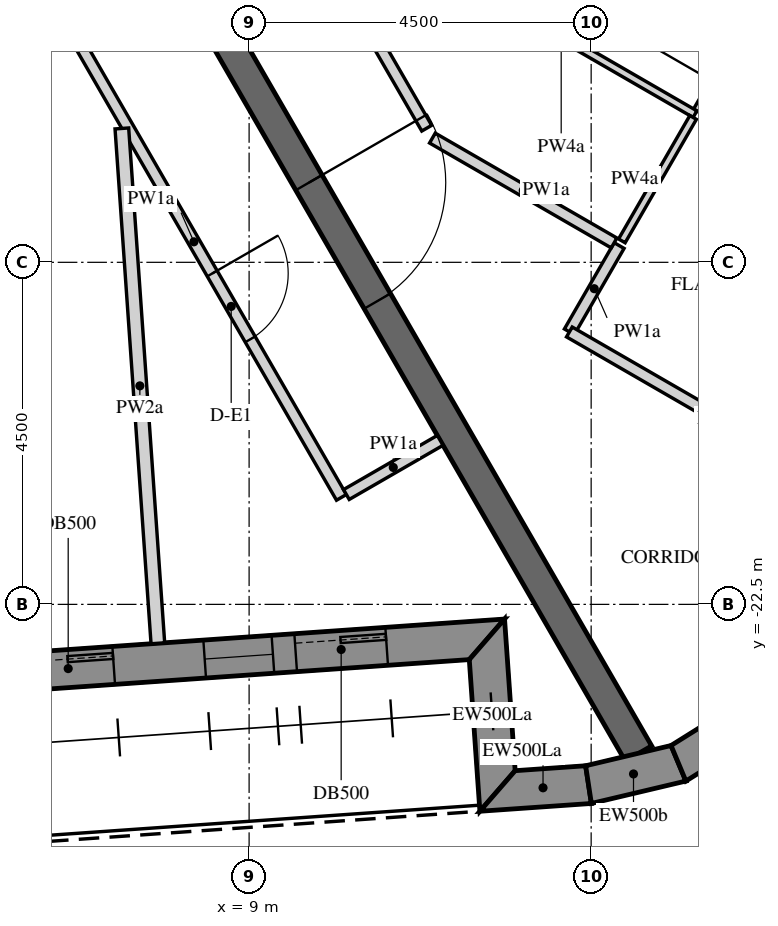
"""IFC4 building model, lengths in metres.
Left out: names, types, materials, properties, quantities, classifications, styles, units other than length and angle.
Written with IfcOpenShell. Run it as: python <this file> out.ifc"""

import sys

from ifc_helpers import new_model, si_unit, direction, frame, frame_2d, origin, place, context, subcontext, project, spatial, polyline, rectangle, outline, extrude, element, fill, save


model = new_model("IFC4")
c1 = context("Model", 3, precision=1e-05, world=origin(), true_north=direction((0.0, 1.0)))
c2 = subcontext(c1, "Body", "Model", "MODEL_VIEW")
j1 = project(units=[si_unit("LENGTHUNIT", "METRE"), si_unit("PLANEANGLEUNIT", "RADIAN")], contexts=[c1])
p1 = place(None, origin())
s1 = spatial("IfcSite", under=j1, at=p1, CompositionType="ELEMENT")
p2 = place(p1, origin())
s2 = spatial("IfcBuilding", under=s1, at=p2, CompositionType="ELEMENT")
p3 = place(p2, frame((0.0, 0.0, 334.2)))
s3 = spatial("IfcBuildingStorey", under=s2, at=p3, CompositionType="ELEMENT", Elevation=334.2)
p4 = place(p3, frame((-10.86, -24.567, -0.15), z_axis=(0.0, 0.0, 1.0), x_axis=(0.997564329317, 0.06975248292, 0.0)))
e1 = element("IfcWall", 1, at=p4, inside=s3, PredefinedType="SOLIDWALL", context=c2, shape_type="SweptSolid", body=[
    extrude(outline(polyline([(0.25, -0.25), (22.795, -0.25), (23.295, 0.25), (-0.25, 0.25), (0.25, -0.25)])), origin(), (0.0, 0.0, 1.0), 3.75),
])
p5 = place(p4, frame((1.323, 0.0, 1.05)))
e2 = element("IfcOpeningElement", 2, at=p5, cuts=e1, PredefinedType="OPENING", context=c2, shape_type="SweptSolid", body=[
    extrude(rectangle(XDim=0.9, YDim=1.5, at=frame_2d((0.45, 0.75))), frame((0.0, 0.26, 0.0), z_axis=(0.0, -1.0, 0.0), x_axis=(1.0, 0.0, 0.0)), (0.0, 0.0, 1.0), 0.52),
])
p6 = place(p4, frame((2.522, 0.0, 0.15)))
e3 = element("IfcOpeningElement", 3, at=p6, cuts=e1, PredefinedType="OPENING", context=c2, shape_type="SweptSolid", body=[
    extrude(rectangle(XDim=1.2, YDim=2.4, at=frame_2d((0.6, 1.2))), frame((0.0, 0.26, 0.0), z_axis=(0.0, -1.0, 0.0), x_axis=(1.0, 0.0, 0.0)), (0.0, 0.0, 1.0), 0.52),
])
p7 = place(p4, frame((4.922, 0.0, 1.05)))
e4 = element("IfcOpeningElement", 4, at=p7, cuts=e1, PredefinedType="OPENING", context=c2, shape_type="SweptSolid", body=[
    extrude(rectangle(XDim=0.9, YDim=1.5, at=frame_2d((0.45, 0.75))), frame((0.0, 0.26, 0.0), z_axis=(0.0, -1.0, 0.0), x_axis=(1.0, 0.0, 0.0)), (0.0, 0.0, 1.0), 0.52),
])
p8 = place(p4, frame((6.122, 0.0, 0.15)))
e5 = element("IfcOpeningElement", 5, at=p8, cuts=e1, PredefinedType="OPENING", context=c2, shape_type="SweptSolid", body=[
    extrude(rectangle(XDim=1.2, YDim=2.4, at=frame_2d((0.6, 1.2))), frame((0.0, 0.26, 0.0), z_axis=(0.0, -1.0, 0.0), x_axis=(1.0, 0.0, 0.0)), (0.0, 0.0, 1.0), 0.52),
])
p9 = place(p4, frame((8.522, 0.0, 1.05)))
e6 = element("IfcOpeningElement", 6, at=p9, cuts=e1, PredefinedType="OPENING", context=c2, shape_type="SweptSolid", body=[
    extrude(rectangle(XDim=0.9, YDim=1.5, at=frame_2d((0.45, 0.75))), frame((0.0, 0.26, 0.0), z_axis=(0.0, -1.0, 0.0), x_axis=(1.0, 0.0, 0.0)), (0.0, 0.0, 1.0), 0.52),
])
p10 = place(p4, frame((9.722, 0.0, 0.15)))
e7 = element("IfcOpeningElement", 7, at=p10, cuts=e1, PredefinedType="OPENING", context=c2, shape_type="SweptSolid", body=[
    extrude(rectangle(XDim=1.2, YDim=2.4, at=frame_2d((0.6, 1.2))), frame((0.0, 0.26, 0.0), z_axis=(0.0, -1.0, 0.0), x_axis=(1.0, 0.0, 0.0)), (0.0, 0.0, 1.0), 0.52),
])
p11 = place(p4, frame((12.122, 0.0, 1.05)))
e8 = element("IfcOpeningElement", 8, at=p11, cuts=e1, PredefinedType="OPENING", context=c2, shape_type="SweptSolid", body=[
    extrude(rectangle(XDim=0.9, YDim=1.5, at=frame_2d((0.45, 0.75))), frame((0.0, 0.26, 0.0), z_axis=(0.0, -1.0, 0.0), x_axis=(1.0, 0.0, 0.0)), (0.0, 0.0, 1.0), 0.52),
])
p12 = place(p4, frame((13.323, 0.0, 0.15)))
e9 = element("IfcOpeningElement", 9, at=p12, cuts=e1, PredefinedType="OPENING", context=c2, shape_type="SweptSolid", body=[
    extrude(rectangle(XDim=1.2, YDim=2.4, at=frame_2d((0.6, 1.2))), frame((0.0, 0.26, 0.0), z_axis=(0.0, -1.0, 0.0), x_axis=(1.0, 0.0, 0.0)), (0.0, 0.0, 1.0), 0.52),
])
p13 = place(p4, frame((15.722, 0.0, 1.05)))
e10 = element("IfcOpeningElement", 10, at=p13, cuts=e1, PredefinedType="OPENING", context=c2, shape_type="SweptSolid", body=[
    extrude(rectangle(XDim=0.9, YDim=1.5, at=frame_2d((0.45, 0.75))), frame((0.0, 0.26, 0.0), z_axis=(0.0, -1.0, 0.0), x_axis=(1.0, 0.0, 0.0)), (0.0, 0.0, 1.0), 0.52),
])
p14 = place(p4, frame((16.922, 0.0, 0.15)))
e11 = element("IfcOpeningElement", 11, at=p14, cuts=e1, PredefinedType="OPENING", context=c2, shape_type="SweptSolid", body=[
    extrude(rectangle(XDim=1.2, YDim=2.4, at=frame_2d((0.6, 1.2))), frame((0.0, 0.26, 0.0), z_axis=(0.0, -1.0, 0.0), x_axis=(1.0, 0.0, 0.0)), (0.0, 0.0, 1.0), 0.52),
])
p15 = place(p4, frame((19.323, 0.0, 1.05)))
e12 = element("IfcOpeningElement", 12, at=p15, cuts=e1, PredefinedType="OPENING", context=c2, shape_type="SweptSolid", body=[
    extrude(rectangle(XDim=0.9, YDim=1.5, at=frame_2d((0.45, 0.75))), frame((0.0, 0.26, 0.0), z_axis=(0.0, -1.0, 0.0), x_axis=(1.0, 0.0, 0.0)), (0.0, 0.0, 1.0), 0.52),
])
p16 = place(p4, frame((20.522, 0.0, 0.15)))
e13 = element("IfcOpeningElement", 13, at=p16, cuts=e1, PredefinedType="OPENING", context=c2, shape_type="SweptSolid", body=[
    extrude(rectangle(XDim=1.2, YDim=2.4, at=frame_2d((0.6, 1.2))), frame((0.0, 0.26, 0.0), z_axis=(0.0, -1.0, 0.0), x_axis=(1.0, 0.0, 0.0)), (0.0, 0.0, 1.0), 0.52),
])
p17 = place(p3, frame((12.129, -22.96, -0.15), z_axis=(0.0, 0.0, 1.0), x_axis=(0.069824268692, -0.99755930726, 0.0)))
e14 = element("IfcWall", 14, at=p17, inside=s3, PredefinedType="SOLIDWALL", context=c2, shape_type="SweptSolid", body=[
    extrude(outline(polyline([(0.25, -0.25), (2.25, -0.25), (1.75, 0.25), (-0.25, 0.25), (0.25, -0.25)])), origin(), (0.0, 0.0, 1.0), 3.75),
])
p18 = place(p3, frame((12.268, -24.955, -0.15), z_axis=(0.0, 0.0, 1.0), x_axis=(0.997561942506, 0.06978660948, 0.0)))
e15 = element("IfcWall", 15, at=p18, inside=s3, PredefinedType="SOLIDWALL", context=c2, shape_type="SweptSolid", body=[
    extrude(outline(polyline([(-0.25, -0.25), (1.22, -0.25), (1.179, 0.25), (0.25, 0.25), (-0.25, -0.25)])), origin(), (0.0, 0.0, 1.0), 3.75),
])
p19 = place(p3, frame((13.465, -24.871, -0.15), z_axis=(0.0, 0.0, 1.0), x_axis=(0.973044740285, 0.230616420501, 0.0)))
e16 = element("IfcWall", 16, at=p19, inside=s3, PredefinedType="SOLIDWALL", context=c2, shape_type="SweptSolid", body=[
    extrude(outline(polyline([(-0.021, -0.25), (1.257, -0.25), (1.175, 0.25), (0.021, 0.25), (-0.021, -0.25)])), origin(), (0.0, 0.0, 1.0), 3.75),
])
p20 = place(p3, frame((14.649, -24.591, -0.15), z_axis=(0.0, 0.0, 1.0), x_axis=(0.848054682072, 0.529908724419, 0.0)))
e17 = element("IfcWall", 17, at=p20, inside=s3, PredefinedType="SOLIDWALL", context=c2, shape_type="SweptSolid", body=[
    extrude(outline(polyline([(-0.041, -0.25), (1.257, -0.25), (1.175, 0.25), (0.041, 0.25), (-0.041, -0.25)])), origin(), (0.0, 0.0, 1.0), 3.75),
])
p21 = place(p3, frame((6.351, -11.0, -0.15), z_axis=(0.0, 0.0, 1.0), x_axis=(0.499998894578, -0.866026041999, 0.0)))
e18 = element("IfcWall", 18, at=p21, inside=s3, PredefinedType="SHEAR", context=c2, shape_type="SweptSolid", body=[
    extrude(rectangle(XDim=15.544, YDim=0.4, at=frame_2d((7.772, 0.0))), origin(), (0.0, 0.0, 1.0), 3.75),
])
p22 = place(p21, frame((6.872, 0.0, 0.15)))
e19 = element("IfcOpeningElement", 19, at=p22, cuts=e18, PredefinedType="OPENING", context=c2, shape_type="SweptSolid", body=[
    extrude(rectangle(XDim=1.8, YDim=2.4, at=frame_2d((0.9, 1.2))), frame((0.0, 0.21, 0.0), z_axis=(0.0, -1.0, 0.0), x_axis=(1.0, 0.0, 0.0)), (0.0, 0.0, 1.0), 0.42),
])
p23 = place(p3, frame((6.333, -14.368, 0.0), z_axis=(0.0, 0.0, 1.0), x_axis=(0.499977396983, -0.866038453249, 0.0)))
e20 = element("IfcWall", 20, at=p23, inside=s3, PredefinedType="PARTITIONING", context=c2, shape_type="SweptSolid", body=[
    extrude(rectangle(XDim=7.764, YDim=0.15, at=frame_2d((3.882, 0.0))), origin(), (0.0, 0.0, 1.0), 2.838),
])
p24 = place(p23, frame((4.364, 0.0, 0.0)))
e21 = element("IfcOpeningElement", 21, at=p24, cuts=e20, PredefinedType="OPENING", context=c2, shape_type="SweptSolid", body=[
    extrude(rectangle(XDim=1.0, YDim=2.1, at=frame_2d((0.5, 1.05))), frame((0.0, 0.085, 0.0), z_axis=(0.0, -1.0, 0.0), x_axis=(1.0, 0.0, 0.0)), (0.0, 0.0, 1.0), 0.17),
])
p25 = place(p3, frame((10.28, -21.055, 0.0), z_axis=(0.0, 0.0, 1.0), x_axis=(0.866020080793, 0.500009219579, 0.0)))
e22 = element("IfcWall", 22, at=p25, inside=s3, PredefinedType="PARTITIONING", context=c2, shape_type="SweptSolid", body=[
    extrude(rectangle(XDim=1.425, YDim=0.15, at=frame_2d((0.712, 0.0))), origin(), (0.0, 0.0, 1.0), 2.838),
])
p26 = place(p3, frame((13.213, -18.915, 0.0), z_axis=(0.0, 0.0, 1.0), x_axis=(0.499985832843, 0.866033583042, 0.0)))
e23 = element("IfcWall", 23, at=p26, inside=s3, PredefinedType="PARTITIONING", context=c2, shape_type="SweptSolid", body=[
    extrude(rectangle(XDim=1.311, YDim=0.15, at=frame_2d((0.655, 0.0))), origin(), (0.0, 0.0, 1.0), 2.838),
])
p27 = place(p3, frame((17.196, -21.216, 0.0), z_axis=(0.0, 0.0, 1.0), x_axis=(-0.866032643562, 0.499987460128, 0.0)))
e24 = element("IfcWall", 24, at=p27, inside=s3, PredefinedType="PARTITIONING", context=c2, shape_type="SweptSolid", body=[
    extrude(rectangle(XDim=4.599, YDim=0.15, at=frame_2d((2.299, 0.0))), origin(), (0.0, 0.0, 1.0), 2.838),
])
p28 = place(p3, frame((13.802, -17.745, 0.0), z_axis=(0.0, 0.0, 1.0), x_axis=(-0.866051521422, 0.499954760196, 0.0)))
e25 = element("IfcWall", 25, at=p28, inside=s3, PredefinedType="PARTITIONING", context=c2, shape_type="SweptSolid", body=[
    extrude(rectangle(XDim=2.76, YDim=0.15, at=frame_2d((1.38, 0.0))), origin(), (0.0, 0.0, 1.0), 2.838),
])
p29 = place(p3, frame((11.337, -16.236, 0.0), z_axis=(0.0, 0.0, 1.0), x_axis=(-0.500029781311, 0.866008208854, 0.0)))
e26 = element("IfcWall", 26, at=p29, inside=s3, PredefinedType="PARTITIONING", context=c2, shape_type="SweptSolid", body=[
    extrude(rectangle(XDim=2.544, YDim=0.15, at=frame_2d((1.272, 0.0))), origin(), (0.0, 0.0, 1.0), 2.838),
])
p30 = place(p3, frame((7.8, -23.012, 0.0), z_axis=(0.0, 0.0, 1.0), x_axis=(-0.069757205717, 0.997563999075, 0.0)))
e27 = element("IfcWall", 27, at=p30, inside=s3, PredefinedType="PARTITIONING", context=c2, shape_type="SweptSolid", body=[
    extrude(rectangle(XDim=6.79, YDim=0.18, at=frame_2d((3.395, 0.0))), origin(), (0.0, 0.0, 1.0), 2.838),
])
p31 = place(p3, frame((14.89, -16.009, 0.0), z_axis=(0.0, 0.0, 1.0), x_axis=(0.499971461383, 0.866041879935, 0.0)))
e28 = element("IfcWall", 28, at=p31, inside=s3, PredefinedType="PARTITIONING", context=c2, shape_type="SweptSolid", body=[
    extrude(rectangle(XDim=1.754, YDim=0.1, at=frame_2d((0.877, 0.0))), origin(), (0.0, 0.0, 1.0), 2.838),
])
p32 = place(p31, frame((0.444, 0.0, 0.0)))
e29 = element("IfcOpeningElement", 29, at=p32, cuts=e28, PredefinedType="OPENING", context=c2, shape_type="SweptSolid", body=[
    extrude(rectangle(XDim=0.9, YDim=2.1, at=frame_2d((0.45, 1.05))), frame((0.0, 0.06, 0.0), z_axis=(0.0, -1.0, 0.0), x_axis=(1.0, 0.0, 0.0)), (0.0, 0.0, 1.0), 0.12),
])
p33 = place(p3, frame((11.345, -14.018, 0.0), z_axis=(0.0, 0.0, 1.0), x_axis=(0.866028600041, -0.49999446388, 0.0)))
e30 = element("IfcWall", 30, at=p33, inside=s3, PredefinedType="PARTITIONING", context=c2, shape_type="SweptSolid", body=[
    extrude(rectangle(XDim=4.066, YDim=0.1, at=frame_2d((2.033, 0.0))), origin(), (0.0, 0.0, 1.0), 2.838),
])
p34 = place(p33, frame((1.566, 0.0, 0.0)))
e31 = element("IfcOpeningElement", 31, at=p34, cuts=e30, PredefinedType="OPENING", context=c2, shape_type="SweptSolid", body=[
    extrude(rectangle(XDim=0.8, YDim=2.1, at=frame_2d((0.4, 1.05))), frame((0.0, 0.06, 0.0), z_axis=(0.0, -1.0, 0.0), x_axis=(1.0, 0.0, 0.0)), (0.0, 0.0, 1.0), 0.12),
])
p35 = place(p3, frame((14.841, -16.094, 0.0), z_axis=(0.0, 0.0, 1.0), x_axis=(-0.500004234368, -0.866022959057, 0.0)))
e32 = element("IfcWall", 32, at=p35, inside=s3, PredefinedType="PARTITIONING", context=c2, shape_type="SweptSolid", body=[
    extrude(rectangle(XDim=1.875, YDim=0.1, at=frame_2d((0.938, 0.0))), origin(), (0.0, 0.0, 1.0), 2.838),
])
p36 = place(p14, frame((0.0, 0.175, 0.0)))
e33 = element("IfcDoor", 33, at=p36, inside=s3, OperationType="SLIDING_TO_LEFT", PredefinedType="DOOR", context=c2, shape_type="SweptSolid", body=[
    extrude(rectangle(XDim=1.2, YDim=2.4, at=frame_2d((0.6, 1.2))), frame((0.0, 0.025, 0.0), z_axis=(0.0, -1.0, 0.0), x_axis=(1.0, 0.0, 0.0)), (0.0, 0.0, 1.0), 0.05),
])
fill(e11, e33)
p37 = place(p15, frame((0.0, 0.18, 0.0)))
e34 = element("IfcWindow", 34, at=p37, inside=s3, PartitioningType="SINGLE_PANEL", PredefinedType="WINDOW", context=c2, shape_type="SweptSolid", body=[
    extrude(rectangle(XDim=0.9, YDim=1.5, at=frame_2d((0.45, 0.75))), frame((0.0, 0.03, 0.0), z_axis=(0.0, -1.0, 0.0), x_axis=(1.0, 0.0, 0.0)), (0.0, 0.0, 1.0), 0.06),
])
fill(e12, e34)
p38 = place(p16, frame((0.0, 0.175, 0.0)))
e35 = element("IfcDoor", 35, at=p38, inside=s3, OperationType="SLIDING_TO_LEFT", PredefinedType="DOOR", context=c2, shape_type="SweptSolid", body=[
    extrude(rectangle(XDim=1.2, YDim=2.4, at=frame_2d((0.6, 1.2))), frame((0.0, 0.025, 0.0), z_axis=(0.0, -1.0, 0.0), x_axis=(1.0, 0.0, 0.0)), (0.0, 0.0, 1.0), 0.05),
])
fill(e13, e35)
p39 = place(p22, origin())
e36 = element("IfcDoor", 36, at=p39, inside=s3, OperationType="DOUBLE_DOOR_SINGLE_SWING", PredefinedType="DOOR", context=c2, shape_type="SweptSolid", body=[
    extrude(rectangle(XDim=1.8, YDim=2.4, at=frame_2d((0.9, 1.2))), frame((0.0, 0.025, 0.0), z_axis=(0.0, -1.0, 0.0), x_axis=(1.0, 0.0, 0.0)), (0.0, 0.0, 1.0), 0.05),
])
fill(e19, e36)
p40 = place(p24, origin())
e37 = element("IfcDoor", 37, at=p40, inside=s3, OperationType="SINGLE_SWING_RIGHT", PredefinedType="DOOR", context=c2, shape_type="SweptSolid", body=[
    extrude(rectangle(XDim=1.0, YDim=2.1, at=frame_2d((0.5, 1.05))), frame((0.0, 0.025, 0.0), z_axis=(0.0, -1.0, 0.0), x_axis=(1.0, 0.0, 0.0)), (0.0, 0.0, 1.0), 0.05),
])
fill(e21, e37)
save(model, sys.argv[1])
